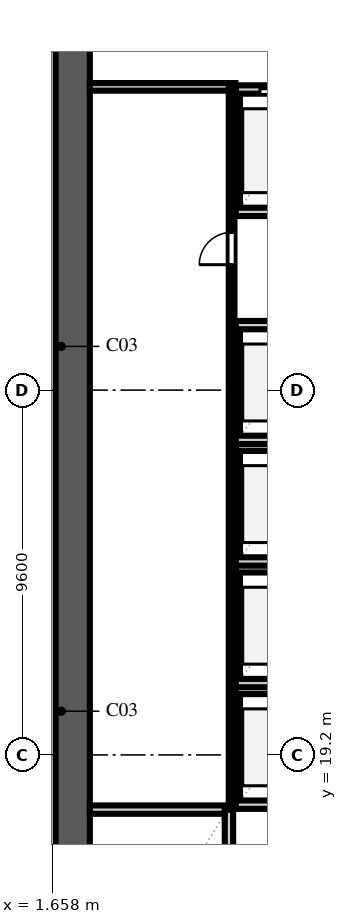
"""IFC4 building model, lengths in metres.
Left out: names, types, materials, properties, quantities, classifications, styles, units other than length and angle.
Written with IfcOpenShell. Run it as: python <this file> out.ifc"""

import sys

from ifc_helpers import new_model, si_unit, direction, frame, frame_2d, origin, place, context, subcontext, project, spatial, rectangle, extrude, element, fill, save


model = new_model("IFC4")
c1 = context("Model", 3, precision=1e-05, world=origin(), true_north=direction((0.0, 1.0)))
c2 = subcontext(c1, "Body", "Model", "MODEL_VIEW")
j1 = project(units=[si_unit("LENGTHUNIT", "METRE"), si_unit("PLANEANGLEUNIT", "RADIAN")], contexts=[c1])
p1 = place(None, origin())
s1 = spatial("IfcSite", under=j1, at=p1, CompositionType="ELEMENT")
p2 = place(p1, origin())
s2 = spatial("IfcBuilding", under=s1, at=p2, CompositionType="ELEMENT")
p3 = place(p2, frame((0.0, 0.0, 58.4)))
s3 = spatial("IfcBuildingStorey", under=s2, at=p3, CompositionType="ELEMENT", Elevation=58.4)
p4 = place(p3, frame((2.2, 9.15, 0.0), z_axis=(0.0, 0.0, 1.0), x_axis=(0.0, 1.0, 0.0)))
e1 = element("IfcWall", 1, at=p4, inside=s3, PredefinedType="SHEAR", context=c2, shape_type="SweptSolid", body=[
    extrude(rectangle(XDim=39.3, YDim=0.9, at=frame_2d((19.65, 0.0))), origin(), (0.0, 0.0, 1.0), 3.54),
])
p5 = place(p3, frame((6.31, 9.95, 0.0), z_axis=(0.0, 0.0, 1.0), x_axis=(0.0, 1.0, 0.0)))
e2 = element("IfcWall", 2, at=p5, inside=s3, PredefinedType="SOLIDWALL", context=c2, shape_type="SweptSolid", body=[
    extrude(rectangle(XDim=7.81, YDim=0.22, at=frame_2d((3.905, 0.0))), origin(), (0.0, 0.0, 1.0), 3.54),
])
p6 = place(p5, frame((0.14, 0.0, 0.0)))
e3 = element("IfcOpeningElement", 3, at=p6, cuts=e2, PredefinedType="OPENING", context=c2, shape_type="SweptSolid", body=[
    extrude(rectangle(XDim=1.1, YDim=2.2, at=frame_2d((0.55, 1.1))), frame((0.0, 0.122, 0.0), z_axis=(0.0, -1.0, 0.0), x_axis=(1.0, 0.0, 0.0)), (0.0, 0.0, 1.0), 0.244),
])
p7 = place(p3, frame((2.65, 17.76, 0.0), z_axis=(0.0, 0.0, 1.0), x_axis=(1.0, 0.0, 0.0)))
e4 = element("IfcWall", 4, at=p7, inside=s3, PredefinedType="SOLIDWALL", context=c2, shape_type="SweptSolid", body=[
    extrude(rectangle(XDim=3.55, YDim=0.22, at=frame_2d((1.775, 0.0))), origin(), (0.0, 0.0, 1.0), 3.54),
])
p8 = place(p3, frame((6.49, 18.11, 0.0), z_axis=(0.0, 0.0, 1.0), x_axis=(0.0, 1.0, 0.0)))
e5 = element("IfcWall", 5, at=p8, inside=s3, PredefinedType="SOLIDWALL", context=c2, shape_type="SweptSolid", body=[
    extrude(rectangle(XDim=2.58, YDim=0.22, at=frame_2d((1.29, 0.0))), origin(), (0.0, 0.0, 1.0), 3.54),
])
for number, where, z_axis, x_axis in (
    (6, (6.49, 17.89, 0.0), (0.0, 0.0, 1.0), (1.0, 0.0, 0.0)),
    (7, (6.49, 20.91, 0.0), (0.0, 0.0, 1.0), (1.0, 0.0, 0.0)),
):
    element("IfcWall", number, at=place(p3, frame(where, z_axis=z_axis, x_axis=x_axis)), inside=s3, PredefinedType="SOLIDWALL", context=c2, shape_type="SweptSolid", body=[
        extrude(rectangle(XDim=2.47, YDim=0.22, at=frame_2d((1.235, 0.0))), origin(), (0.0, 0.0, 1.0), 3.54),
    ])
p9 = place(p3, frame((6.49, 21.31, 0.0), z_axis=(0.0, 0.0, 1.0), x_axis=(0.0, 1.0, 0.0)))
e8 = element("IfcWall", 8, at=p9, inside=s3, PredefinedType="SOLIDWALL", context=c2, shape_type="SweptSolid", body=[
    extrude(rectangle(XDim=2.58, YDim=0.22, at=frame_2d((1.29, 0.0))), origin(), (0.0, 0.0, 1.0), 3.54),
])
for number, where, z_axis, x_axis in (
    (9, (6.49, 21.09, 0.0), (0.0, 0.0, 1.0), (1.0, 0.0, 0.0)),
    (10, (6.49, 24.11, 0.0), (0.0, 0.0, 1.0), (1.0, 0.0, 0.0)),
):
    element("IfcWall", number, at=place(p3, frame(where, z_axis=z_axis, x_axis=x_axis)), inside=s3, PredefinedType="SOLIDWALL", context=c2, shape_type="SweptSolid", body=[
        extrude(rectangle(XDim=2.47, YDim=0.22, at=frame_2d((1.235, 0.0))), origin(), (0.0, 0.0, 1.0), 3.54),
    ])
p10 = place(p3, frame((6.49, 24.51, 0.0), z_axis=(0.0, 0.0, 1.0), x_axis=(0.0, 1.0, 0.0)))
e11 = element("IfcWall", 11, at=p10, inside=s3, PredefinedType="SOLIDWALL", context=c2, shape_type="SweptSolid", body=[
    extrude(rectangle(XDim=2.58, YDim=0.22, at=frame_2d((1.29, 0.0))), origin(), (0.0, 0.0, 1.0), 3.54),
])
for number, where, z_axis, x_axis in (
    (12, (6.49, 24.29, 0.0), (0.0, 0.0, 1.0), (1.0, 0.0, 0.0)),
    (13, (6.49, 27.31, 0.0), (0.0, 0.0, 1.0), (1.0, 0.0, 0.0)),
):
    element("IfcWall", number, at=place(p3, frame(where, z_axis=z_axis, x_axis=x_axis)), inside=s3, PredefinedType="SOLIDWALL", context=c2, shape_type="SweptSolid", body=[
        extrude(rectangle(XDim=2.47, YDim=0.22, at=frame_2d((1.235, 0.0))), origin(), (0.0, 0.0, 1.0), 3.54),
    ])
p11 = place(p3, frame((6.49, 27.71, 0.0), z_axis=(0.0, 0.0, 1.0), x_axis=(0.0, 1.0, 0.0)))
e14 = element("IfcWall", 14, at=p11, inside=s3, PredefinedType="SOLIDWALL", context=c2, shape_type="SweptSolid", body=[
    extrude(rectangle(XDim=2.58, YDim=0.22, at=frame_2d((1.29, 0.0))), origin(), (0.0, 0.0, 1.0), 3.54),
])
for number, where, z_axis, x_axis in (
    (15, (6.49, 27.49, 0.0), (0.0, 0.0, 1.0), (1.0, 0.0, 0.0)),
    (16, (6.49, 30.51, 0.0), (0.0, 0.0, 1.0), (1.0, 0.0, 0.0)),
):
    element("IfcWall", number, at=place(p3, frame(where, z_axis=z_axis, x_axis=x_axis)), inside=s3, PredefinedType="SOLIDWALL", context=c2, shape_type="SweptSolid", body=[
        extrude(rectangle(XDim=2.47, YDim=0.22, at=frame_2d((1.235, 0.0))), origin(), (0.0, 0.0, 1.0), 3.54),
    ])
p12 = place(p3, frame((6.49, 33.71, 0.0), z_axis=(0.0, 0.0, 1.0), x_axis=(0.0, 1.0, 0.0)))
e17 = element("IfcWall", 17, at=p12, inside=s3, PredefinedType="SOLIDWALL", context=c2, shape_type="SweptSolid", body=[
    extrude(rectangle(XDim=2.78, YDim=0.22, at=frame_2d((1.39, 0.0))), origin(), (0.0, 0.0, 1.0), 3.54),
])
p13 = place(p3, frame((6.49, 33.49, 0.0), z_axis=(0.0, 0.0, 1.0), x_axis=(1.0, 0.0, 0.0)))
e18 = element("IfcWall", 18, at=p13, inside=s3, PredefinedType="SOLIDWALL", context=c2, shape_type="SweptSolid", body=[
    extrude(rectangle(XDim=2.47, YDim=0.22, at=frame_2d((1.235, 0.0))), origin(), (0.0, 0.0, 1.0), 3.54),
])
p14 = place(p3, frame((6.49, 36.71, 0.0), z_axis=(0.0, 0.0, 1.0), x_axis=(1.0, 0.0, 0.0)))
e19 = element("IfcWall", 19, at=p14, inside=s3, PredefinedType="SOLIDWALL", context=c2, shape_type="SweptSolid", body=[
    extrude(rectangle(XDim=2.47, YDim=0.22, at=frame_2d((1.235, 0.0))), origin(), (0.0, 0.0, 1.0), 3.54),
])
p15 = place(p14, frame((0.635, 0.0, 0.0)))
e20 = element("IfcOpeningElement", 20, at=p15, cuts=e19, PredefinedType="OPENING", context=c2, shape_type="SweptSolid", body=[
    extrude(rectangle(XDim=1.2, YDim=2.2, at=frame_2d((0.6, 1.1))), frame((0.0, 0.122, 0.0), z_axis=(0.0, -1.0, 0.0), x_axis=(1.0, 0.0, 0.0)), (0.0, 0.0, 1.0), 0.244),
])
p16 = place(p3, frame((2.65, 36.78, 0.0), z_axis=(0.0, 0.0, 1.0), x_axis=(1.0, 0.0, 0.0)))
e21 = element("IfcWall", 21, at=p16, inside=s3, PredefinedType="SOLIDWALL", context=c2, shape_type="SweptSolid", body=[
    extrude(rectangle(XDim=3.83, YDim=0.2, at=frame_2d((1.915, 0.0))), origin(), (0.0, 0.0, 1.0), 3.54),
])
p17 = place(p3, frame((6.38, 17.8, 0.0), z_axis=(0.0, 0.0, 1.0), x_axis=(0.0, 1.0, 0.0)))
e22 = element("IfcWall", 22, at=p17, inside=s3, PredefinedType="PARTITIONING", context=c2, shape_type="SweptSolid", body=[
    extrude(rectangle(XDim=18.98, YDim=0.15, at=frame_2d((9.49, 0.0))), origin(), (0.0, 0.0, 1.0), 3.54),
])
p18 = place(p17, frame((14.3, 0.0, 0.0)))
e23 = element("IfcOpeningElement", 23, at=p18, cuts=e22, PredefinedType="OPENING", context=c2, shape_type="SweptSolid", body=[
    extrude(rectangle(XDim=0.85, YDim=2.1, at=frame_2d((0.425, 1.05))), frame((0.0, 0.087, 0.0), z_axis=(0.0, -1.0, 0.0), x_axis=(1.0, 0.0, 0.0)), (0.0, 0.0, 1.0), 0.174),
])
p19 = place(p15, origin())
e24 = element("IfcDoor", 24, at=p19, inside=s3, OperationType="DOUBLE_DOOR_SLIDING", PredefinedType="DOOR", context=c2, shape_type="SweptSolid", body=[
    extrude(rectangle(XDim=1.2, YDim=2.2, at=frame_2d((0.6, 1.1))), frame((0.0, 0.025, 0.0), z_axis=(0.0, -1.0, 0.0), x_axis=(1.0, 0.0, 0.0)), (0.0, 0.0, 1.0), 0.05),
])
fill(e20, e24)
p20 = place(p18, origin())
e25 = element("IfcDoor", 25, at=p20, inside=s3, OperationType="SINGLE_SWING_LEFT", PredefinedType="DOOR", context=c2, shape_type="SweptSolid", body=[
    extrude(rectangle(XDim=0.85, YDim=2.1, at=frame_2d((0.425, 1.05))), frame((0.0, 0.025, 0.0), z_axis=(0.0, -1.0, 0.0), x_axis=(1.0, 0.0, 0.0)), (0.0, 0.0, 1.0), 0.05),
])
fill(e23, e25)
save(model, sys.argv[1])
